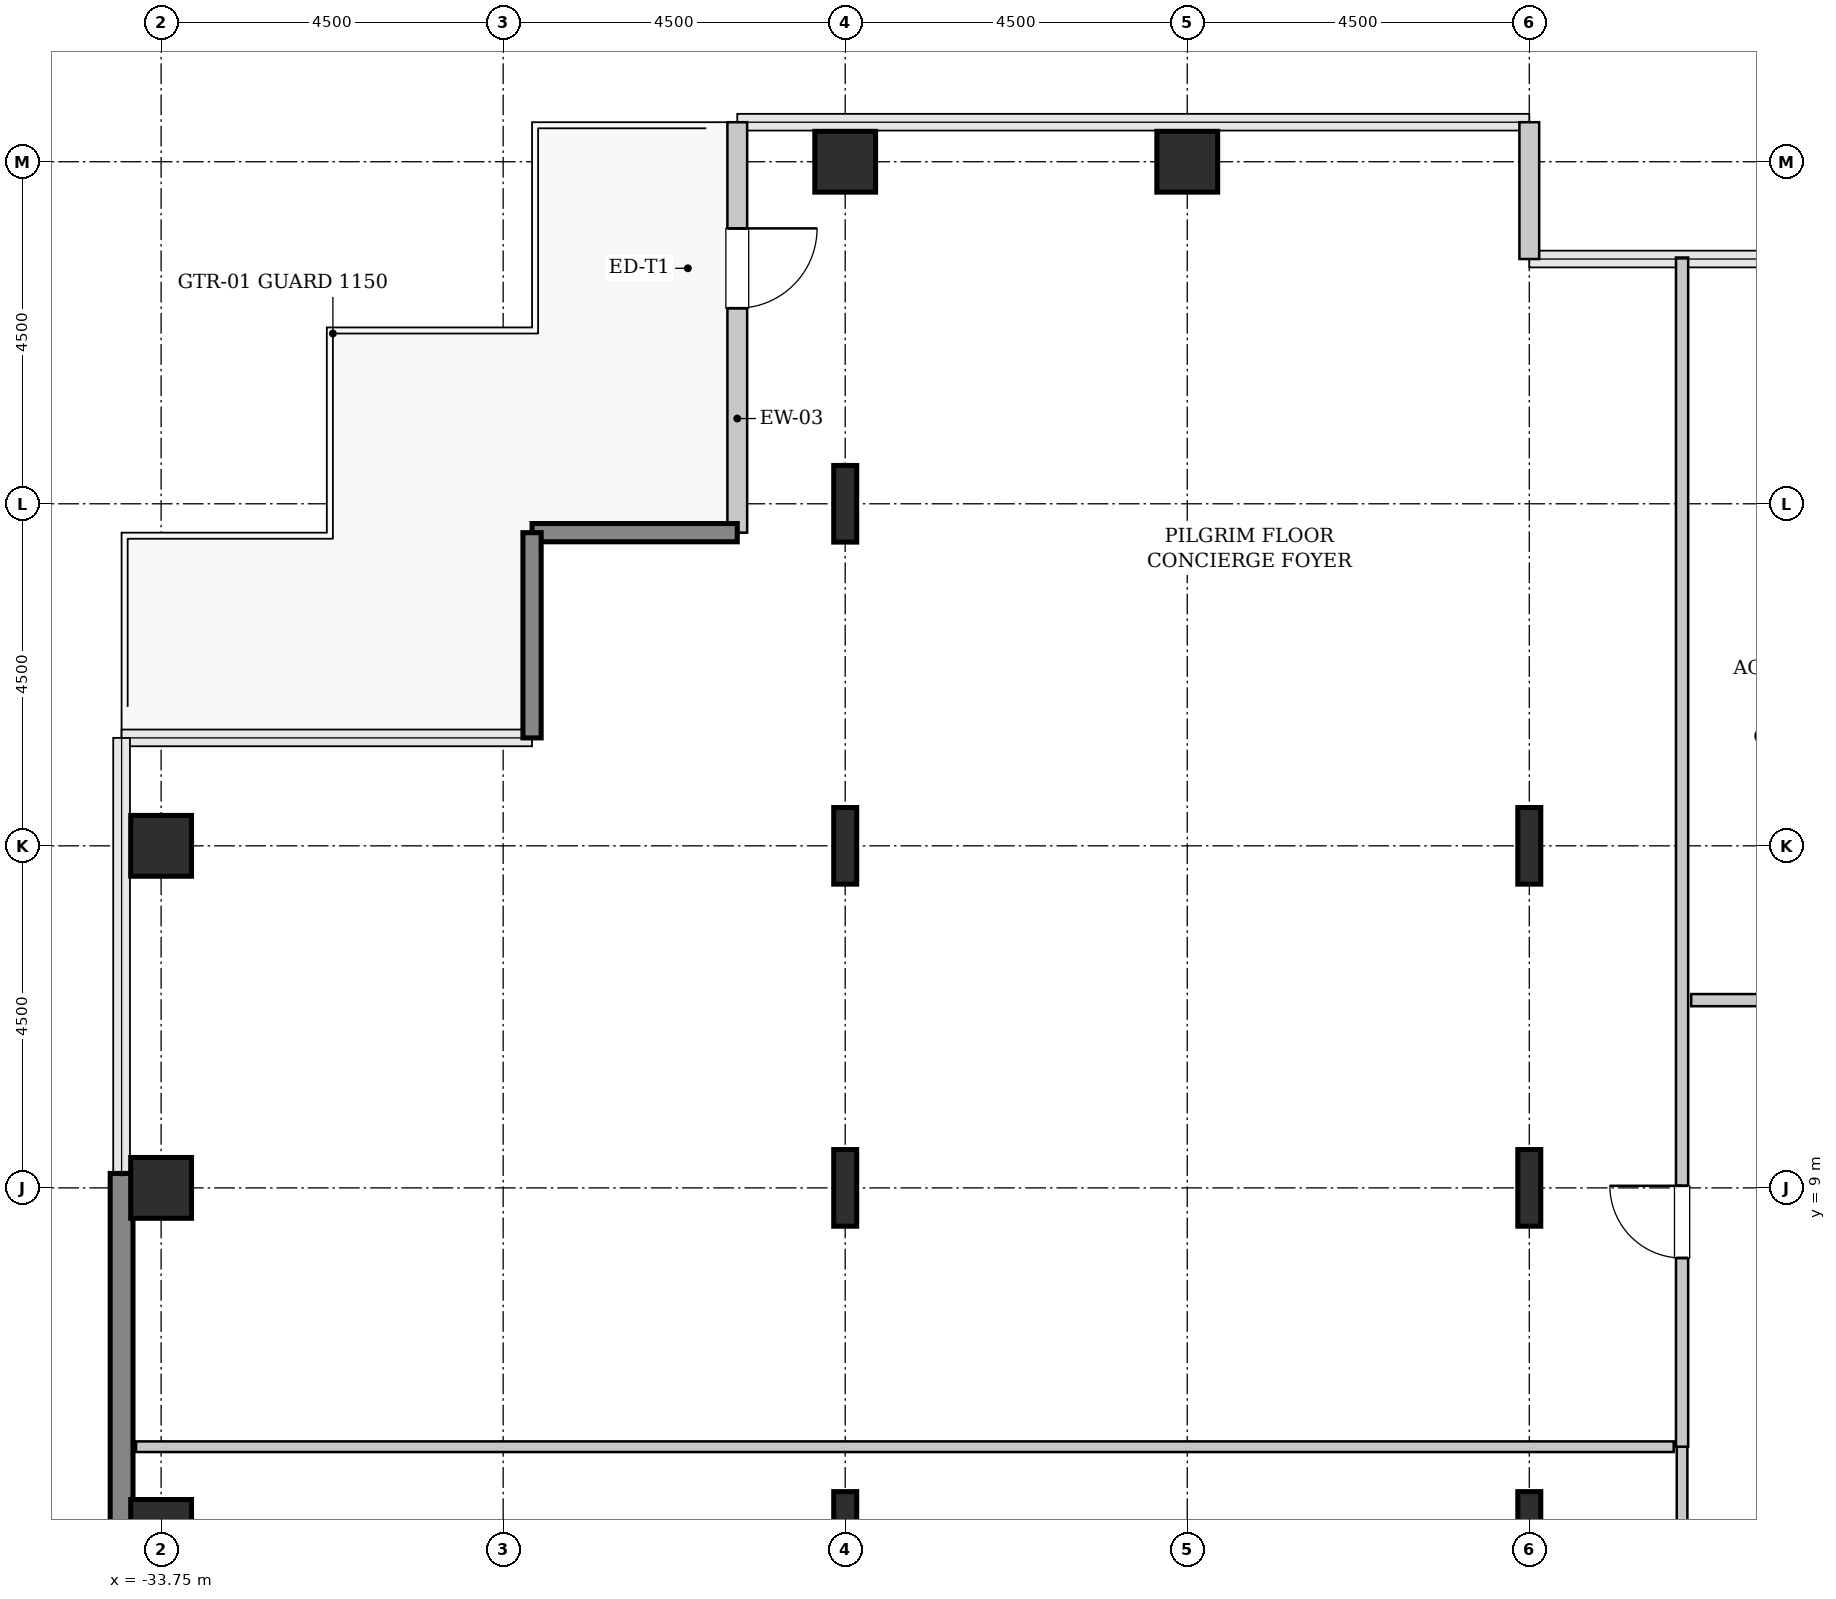
"""IFC4 building model, lengths in metres.
Left out: names, types, materials, properties, quantities, classifications, styles, units other than length and angle.
Written with IfcOpenShell. Run it as: python <this file> out.ifc"""

import sys

from ifc_helpers import new_model, si_unit, direction, frame, frame_2d, origin, origin_2d, place, context, subcontext, project, spatial, rectangle, hollow_rectangle, i_section, extrude, source, transform, mapped, element, fill, save


model = new_model("IFC4")
c1 = context("Model", 3, precision=1e-05, world=origin(), true_north=direction((0.0, 1.0)))
c2 = subcontext(c1, "Body", "Model", "MODEL_VIEW")
j1 = project(units=[si_unit("LENGTHUNIT", "METRE"), si_unit("PLANEANGLEUNIT", "RADIAN")], contexts=[c1])
p1 = place(None, origin())
s1 = spatial("IfcSite", under=j1, at=p1, CompositionType="ELEMENT")
p2 = place(p1, origin())
s2 = spatial("IfcBuilding", under=s1, at=p2, CompositionType="ELEMENT")
p3 = place(p2, frame((0.0, 0.0, 125.0)))
s3 = spatial("IfcBuildingStorey", under=s2, at=p3, CompositionType="ELEMENT", Elevation=125.0)
m1 = source(origin(), c2, "Body", "SweptSolid", [
    extrude(hollow_rectangle(XDim=0.8, YDim=0.8, WallThickness=0.04, InnerFilletRadius=0.04, OuterFilletRadius=0.08, at=origin_2d()), origin(), (0.0, 0.0, 1.0), 3.8),
])
for number, where, z_axis, x_axis in (
    (1, (-33.75, 4.5, 0.0), (0.0, 0.0, 1.0), (1.0, 0.0, 0.0)),
    (2, (-33.75, 9.0, 0.0), (0.0, 0.0, 1.0), (1.0, 0.0, 0.0)),
    (3, (-33.75, 13.5, 0.0), (0.0, 0.0, 1.0), (1.0, 0.0, 0.0)),
):
    element("IfcColumn", number, at=place(p3, frame(where, z_axis=z_axis, x_axis=x_axis)), inside=s3, PredefinedType="COLUMN", context=c2, shape_type="MappedRepresentation", body=[
        mapped(m1, transform((0.0, 0.0, 0.0), x_axis=(1.0, 0.0, 0.0), y_axis=(0.0, 1.0, 0.0), z_axis=(0.0, 0.0, 1.0), scale=1.0)),
    ])
m2 = source(origin(), c2, "Body", "SweptSolid", [
    extrude(i_section(OverallWidth=0.302, OverallDepth=1.008, WebThickness=0.021, FlangeThickness=0.04, FilletRadius=0.03, at=origin_2d()), origin(), (0.0, 0.0, 1.0), 3.8),
])
for number, where, z_axis, x_axis in (
    (4, (-24.75, 4.5, 0.0), (0.0, 0.0, 1.0), (1.0, 0.0, 0.0)),
    (5, (-24.75, 9.0, 0.0), (0.0, 0.0, 1.0), (1.0, 0.0, 0.0)),
    (6, (-24.75, 13.5, 0.0), (0.0, 0.0, 1.0), (1.0, 0.0, 0.0)),
    (7, (-24.75, 18.0, 0.0), (0.0, 0.0, 1.0), (1.0, 0.0, 0.0)),
):
    element("IfcColumn", number, at=place(p3, frame(where, z_axis=z_axis, x_axis=x_axis)), inside=s3, PredefinedType="COLUMN", context=c2, shape_type="MappedRepresentation", body=[
        mapped(m2, transform((0.0, 0.0, 0.0), x_axis=(1.0, 0.0, 0.0), y_axis=(0.0, 1.0, 0.0), z_axis=(0.0, 0.0, 1.0), scale=1.0)),
    ])
for number, where, z_axis, x_axis in (
    (8, (-24.75, 22.5, 0.0), (0.0, 0.0, 1.0), (1.0, 0.0, 0.0)),
    (9, (-20.25, 22.5, 0.0), (0.0, 0.0, 1.0), (1.0, 0.0, 0.0)),
):
    element("IfcColumn", number, at=place(p3, frame(where, z_axis=z_axis, x_axis=x_axis)), inside=s3, PredefinedType="COLUMN", context=c2, shape_type="MappedRepresentation", body=[
        mapped(m1, transform((0.0, 0.0, 0.0), x_axis=(1.0, 0.0, 0.0), y_axis=(0.0, 1.0, 0.0), z_axis=(0.0, 0.0, 1.0), scale=1.0)),
    ])
for number, where, z_axis, x_axis in (
    (10, (-15.75, 4.5, 0.0), (0.0, 0.0, 1.0), (1.0, 0.0, 0.0)),
    (11, (-15.75, 9.0, 0.0), (0.0, 0.0, 1.0), (1.0, 0.0, 0.0)),
    (12, (-15.75, 13.5, 0.0), (0.0, 0.0, 1.0), (1.0, 0.0, 0.0)),
):
    element("IfcColumn", number, at=place(p3, frame(where, z_axis=z_axis, x_axis=x_axis)), inside=s3, PredefinedType="COLUMN", context=c2, shape_type="MappedRepresentation", body=[
        mapped(m2, transform((0.0, 0.0, 0.0), x_axis=(1.0, 0.0, 0.0), y_axis=(0.0, 1.0, 0.0), z_axis=(0.0, 0.0, 1.0), scale=1.0)),
    ])
m3 = source(origin(), c2, "Body", "SweptSolid", [
    extrude(rectangle(XDim=4.88, YDim=0.3, at=frame_2d((2.44, 0.0))), origin(), (0.0, 0.0, 1.0), 3.55),
])
p4 = place(p3, frame((-34.27, 4.31, 0.0), z_axis=(0.0, 0.0, 1.0), x_axis=(0.0, 1.0, 0.0)))
e13 = element("IfcWall", 13, at=p4, inside=s3, PredefinedType="SHEAR", context=c2, shape_type="MappedRepresentation", body=[
    mapped(m3, transform((0.0, 0.0, 0.0), x_axis=(1.0, 0.0, 0.0), y_axis=(0.0, 1.0, 0.0), z_axis=(0.0, 0.0, 1.0), scale=1.0)),
])
m4 = source(origin(), c2, "Body", "SweptSolid", [
    extrude(rectangle(XDim=1.8, YDim=0.26, at=frame_2d((0.9, 0.0))), origin(), (0.0, 0.0, 1.0), 3.55),
])
p5 = place(p3, frame((-15.75, 21.22, 0.0), z_axis=(0.0, 0.0, 1.0), x_axis=(0.0, 1.0, 0.0)))
e14 = element("IfcWall", 14, at=p5, inside=s3, PredefinedType="SOLIDWALL", context=c2, shape_type="MappedRepresentation", body=[
    mapped(m4, transform((0.0, 0.0, 0.0), x_axis=(1.0, 0.0, 0.0), y_axis=(0.0, 1.0, 0.0), z_axis=(0.0, 0.0, 1.0), scale=1.0)),
])
m5 = source(origin(), c2, "Body", "SweptSolid", [
    extrude(rectangle(XDim=5.4, YDim=0.26, at=frame_2d((2.7, 0.0))), origin(), (0.0, 0.0, 1.0), 3.55),
])
p6 = place(p3, frame((-26.17, 23.02, 0.0), z_axis=(0.0, 0.0, 1.0), x_axis=(0.0, -1.0, 0.0)))
e15 = element("IfcWall", 15, at=p6, inside=s3, PredefinedType="SOLIDWALL", context=c2, shape_type="MappedRepresentation", body=[
    mapped(m5, transform((0.0, 0.0, 0.0), x_axis=(1.0, 0.0, 0.0), y_axis=(0.0, 1.0, 0.0), z_axis=(0.0, 0.0, 1.0), scale=1.0)),
])
p7 = place(p6, frame((1.397, 0.0, 0.0)))
e16 = element("IfcOpeningElement", 16, at=p7, cuts=e15, PredefinedType="OPENING", context=c2, shape_type="SweptSolid", body=[
    extrude(rectangle(XDim=1.05, YDim=2.2, at=frame_2d((0.525, 1.1))), frame((0.0, 0.14, 0.0), z_axis=(0.0, -1.0, 0.0), x_axis=(1.0, 0.0, 0.0)), (0.0, 0.0, 1.0), 0.28),
])
m6 = source(origin(), c2, "Body", "SweptSolid", [
    extrude(rectangle(XDim=2.7, YDim=0.24, at=frame_2d((1.35, 0.0))), origin(), (0.0, 0.0, 1.0), 3.55),
])
for number, where, z_axis, x_axis in (
    (17, (-26.17, 17.62, 0.0), (0.0, 0.0, 1.0), (-1.0, 0.0, 0.0)),
    (18, (-28.87, 17.62, 0.0), (0.0, 0.0, 1.0), (0.0, -1.0, 0.0)),
):
    element("IfcWall", number, at=place(p3, frame(where, z_axis=z_axis, x_axis=x_axis)), inside=s3, PredefinedType="SHEAR", context=c2, shape_type="MappedRepresentation", body=[
        mapped(m6, transform((0.0, 0.0, 0.0), x_axis=(1.0, 0.0, 0.0), y_axis=(0.0, 1.0, 0.0), z_axis=(0.0, 0.0, 1.0), scale=1.0)),
    ])
m7 = source(origin(), c2, "Body", "SweptSolid", [
    extrude(rectangle(XDim=2.375, YDim=0.14, at=frame_2d((1.188, 0.0))), origin(), (0.0, 0.0, 1.0), 3.535),
])
p8 = place(p3, frame((-13.74, 3.23, 0.0), z_axis=(0.0, 0.0, 1.0), x_axis=(0.0, 1.0, 0.0)))
e19 = element("IfcWall", 19, at=p8, inside=s3, PredefinedType="PARTITIONING", context=c2, shape_type="MappedRepresentation", body=[
    mapped(m7, transform((0.0, 0.0, 0.0), x_axis=(1.0, 0.0, 0.0), y_axis=(0.0, 1.0, 0.0), z_axis=(0.0, 0.0, 1.0), scale=1.0)),
])
m8 = source(origin(), c2, "Body", "SweptSolid", [
    extrude(rectangle(XDim=20.23, YDim=0.14, at=frame_2d((10.115, 0.0))), origin(), (0.0, 0.0, 1.0), 3.535),
])
p9 = place(p3, frame((-34.08, 5.595, 0.0), z_axis=(0.0, 0.0, 1.0), x_axis=(1.0, 0.0, 0.0)))
e20 = element("IfcWall", 20, at=p9, inside=s3, PredefinedType="PARTITIONING", context=c2, shape_type="MappedRepresentation", body=[
    mapped(m8, transform((0.0, 0.0, 0.0), x_axis=(1.0, 0.0, 0.0), y_axis=(0.0, 1.0, 0.0), z_axis=(0.0, 0.0, 1.0), scale=1.0)),
])
m9 = source(origin(), c2, "Body", "SweptSolid", [
    extrude(rectangle(XDim=15.645, YDim=0.16, at=frame_2d((7.823, 0.0))), origin(), (0.0, 0.0, 1.0), 3.535),
])
p10 = place(p3, frame((-13.74, 5.595, 0.0), z_axis=(0.0, 0.0, 1.0), x_axis=(0.0, 1.0, 0.0)))
e21 = element("IfcWall", 21, at=p10, inside=s3, PredefinedType="PARTITIONING", context=c2, shape_type="MappedRepresentation", body=[
    mapped(m9, transform((0.0, 0.0, 0.0), x_axis=(1.0, 0.0, 0.0), y_axis=(0.0, 1.0, 0.0), z_axis=(0.0, 0.0, 1.0), scale=1.0)),
])
p11 = place(p10, frame((2.482, 0.0, 0.0)))
e22 = element("IfcOpeningElement", 22, at=p11, cuts=e21, PredefinedType="OPENING", context=c2, shape_type="SweptSolid", body=[
    extrude(rectangle(XDim=0.95, YDim=2.1, at=frame_2d((0.475, 1.05))), frame((0.0, 0.09, 0.0), z_axis=(0.0, -1.0, 0.0), x_axis=(1.0, 0.0, 0.0)), (0.0, 0.0, 1.0), 0.18),
])
m10 = source(origin(), c2, "Body", "SweptSolid", [
    extrude(rectangle(XDim=4.125, YDim=0.16, at=frame_2d((2.062, 0.0))), origin(), (0.0, 0.0, 1.0), 3.535),
])
p12 = place(p3, frame((-13.62, 11.47, 0.0), z_axis=(0.0, 0.0, 1.0), x_axis=(1.0, 0.0, 0.0)))
e23 = element("IfcWall", 23, at=p12, inside=s3, PredefinedType="PARTITIONING", context=c2, shape_type="MappedRepresentation", body=[
    mapped(m10, transform((0.0, 0.0, 0.0), x_axis=(1.0, 0.0, 0.0), y_axis=(0.0, 1.0, 0.0), z_axis=(0.0, 0.0, 1.0), scale=1.0)),
])
p13 = place(p12, frame((1.587, 0.0, 0.0)))
e24 = element("IfcOpeningElement", 24, at=p13, cuts=e23, PredefinedType="OPENING", context=c2, shape_type="SweptSolid", body=[
    extrude(rectangle(XDim=0.95, YDim=2.1, at=frame_2d((0.475, 1.05))), frame((0.0, 0.09, 0.0), z_axis=(0.0, -1.0, 0.0), x_axis=(1.0, 0.0, 0.0)), (0.0, 0.0, 1.0), 0.18),
])
m11 = source(origin(), c2, "Body", "SweptSolid", [
    extrude(rectangle(XDim=1.05, YDim=2.2, at=frame_2d((0.525, 1.1))), frame((0.0, 0.025, 0.0), z_axis=(0.0, -1.0, 0.0), x_axis=(1.0, 0.0, 0.0)), (0.0, 0.0, 1.0), 0.05),
])
p14 = place(p7, origin())
e25 = element("IfcDoor", 25, at=p14, inside=s3, OperationType="SINGLE_SWING_LEFT", PredefinedType="DOOR", context=c2, shape_type="MappedRepresentation", body=[
    mapped(m11, transform((0.0, 0.0, 0.0), x_axis=(1.0, 0.0, 0.0), y_axis=(0.0, 1.0, 0.0), z_axis=(0.0, 0.0, 1.0), scale=1.0)),
])
fill(e16, e25)
m12 = source(origin(), c2, "Body", "SweptSolid", [
    extrude(rectangle(XDim=0.95, YDim=2.1, at=frame_2d((0.475, 1.05))), frame((0.0, 0.025, 0.0), z_axis=(0.0, -1.0, 0.0), x_axis=(1.0, 0.0, 0.0)), (0.0, 0.0, 1.0), 0.05),
])
p15 = place(p11, origin())
e26 = element("IfcDoor", 26, at=p15, inside=s3, OperationType="SINGLE_SWING_RIGHT", PredefinedType="DOOR", context=c2, shape_type="MappedRepresentation", body=[
    mapped(m12, transform((0.0, 0.0, 0.0), x_axis=(1.0, 0.0, 0.0), y_axis=(0.0, 1.0, 0.0), z_axis=(0.0, 0.0, 1.0), scale=1.0)),
])
fill(e22, e26)
save(model, sys.argv[1])
